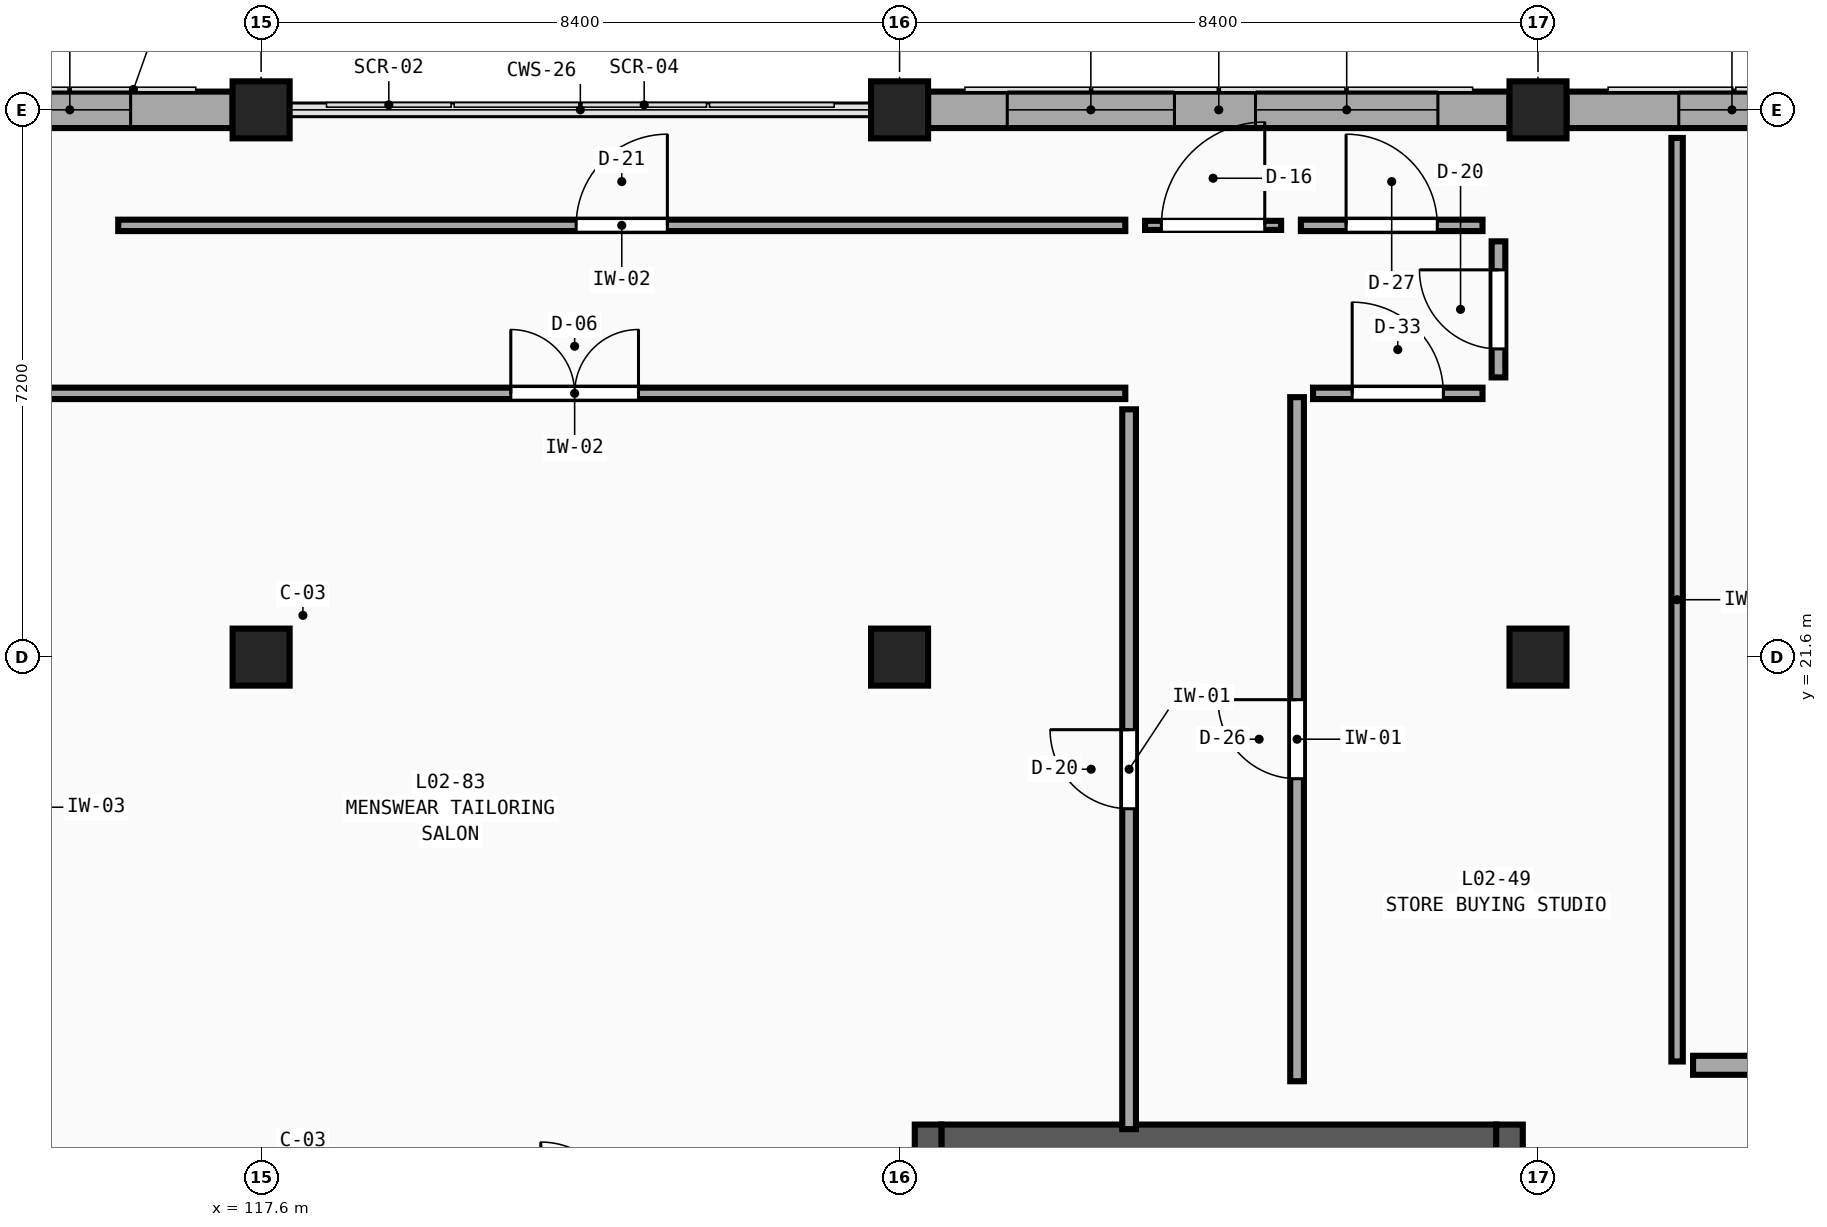
"""IFC4 building model, lengths in metres.
Left out: names, types, materials, properties, quantities, classifications, styles, units other than length and angle.
Written with IfcOpenShell. Run it as: python <this file> out.ifc"""

import sys

from ifc_helpers import new_model, si_unit, direction, frame, frame_2d, origin, origin_2d, place, context, subcontext, project, spatial, rectangle, extrude, element, fill, save


model = new_model("IFC4")
c1 = context("Model", 3, precision=1e-05, world=origin(), true_north=direction((0.0, 1.0)))
c2 = subcontext(c1, "Body", "Model", "MODEL_VIEW")
j1 = project(units=[si_unit("LENGTHUNIT", "METRE"), si_unit("PLANEANGLEUNIT", "RADIAN")], contexts=[c1])
p1 = place(None, origin())
s1 = spatial("IfcSite", under=j1, at=p1, CompositionType="ELEMENT")
p2 = place(p1, origin())
s2 = spatial("IfcBuilding", under=s1, at=p2, CompositionType="ELEMENT")
p3 = place(p2, frame((0.0, 0.0, 9.9)))
s3 = spatial("IfcBuildingStorey", under=s2, at=p3, CompositionType="ELEMENT", Elevation=9.9)
for number, where, z_axis, x_axis in (
    (1, (117.6, 21.6, 0.0), (0.0, 0.0, 1.0), (1.0, 0.0, 0.0)),
    (2, (117.6, 28.8, 0.0), (0.0, 0.0, 1.0), (1.0, 0.0, 0.0)),
    (3, (126.0, 21.6, 0.0), (0.0, 0.0, 1.0), (1.0, 0.0, 0.0)),
    (4, (126.0, 28.8, 0.0), (0.0, 0.0, 1.0), (1.0, 0.0, 0.0)),
    (5, (134.4, 21.6, 0.0), (0.0, 0.0, 1.0), (1.0, 0.0, 0.0)),
    (6, (134.4, 28.8, 0.0), (0.0, 0.0, 1.0), (1.0, 0.0, 0.0)),
):
    element("IfcColumn", number, at=place(p3, frame(where, z_axis=z_axis, x_axis=x_axis)), inside=s3, PredefinedType="COLUMN", context=c2, shape_type="SweptSolid", body=[
        extrude(rectangle(XDim=0.75, YDim=0.75, at=origin_2d()), origin(), (0.0, 0.0, 1.0), 4.5),
    ])
p4 = place(p3, frame((109.575, 28.8, 0.0), z_axis=(0.0, 0.0, 1.0), x_axis=(1.0, 0.0, 0.0)))
e7 = element("IfcWall", 7, at=p4, inside=s3, PredefinedType="SOLIDWALL", context=c2, shape_type="SweptSolid", body=[
    extrude(rectangle(XDim=7.65, YDim=0.48, at=frame_2d((3.825, 0.0))), origin(), (0.0, 0.0, 1.0), 3.63),
])
p5 = place(p4, frame((1.442, 0.0, 0.75)))
e8 = element("IfcOpeningElement", 8, at=p5, cuts=e7, PredefinedType="OPENING", context=c2, shape_type="SweptSolid", body=[
    extrude(rectangle(XDim=1.4, YDim=2.73, at=frame_2d((0.7, 1.365))), frame((0.0, 0.26, 0.0), z_axis=(0.0, -1.0, 0.0), x_axis=(1.0, 0.0, 0.0)), (0.0, 0.0, 1.0), 0.52),
])
p6 = place(p4, frame((4.708, 0.0, 0.75)))
e9 = element("IfcOpeningElement", 9, at=p6, cuts=e7, PredefinedType="OPENING", context=c2, shape_type="SweptSolid", body=[
    extrude(rectangle(XDim=1.6, YDim=2.73, at=frame_2d((0.8, 1.365))), frame((0.0, 0.26, 0.0), z_axis=(0.0, -1.0, 0.0), x_axis=(1.0, 0.0, 0.0)), (0.0, 0.0, 1.0), 0.52),
])
p7 = place(p3, frame((126.375, 28.8, 0.0), z_axis=(0.0, 0.0, 1.0), x_axis=(1.0, 0.0, 0.0)))
e10 = element("IfcWall", 10, at=p7, inside=s3, PredefinedType="SOLIDWALL", context=c2, shape_type="SweptSolid", body=[
    extrude(rectangle(XDim=7.65, YDim=0.48, at=frame_2d((3.825, 0.0))), origin(), (0.0, 0.0, 1.0), 3.63),
])
p8 = place(p7, frame((1.042, 0.0, 0.75)))
e11 = element("IfcOpeningElement", 11, at=p8, cuts=e10, PredefinedType="OPENING", context=c2, shape_type="SweptSolid", body=[
    extrude(rectangle(XDim=2.2, YDim=2.73, at=frame_2d((1.1, 1.365))), frame((0.0, 0.26, 0.0), z_axis=(0.0, -1.0, 0.0), x_axis=(1.0, 0.0, 0.0)), (0.0, 0.0, 1.0), 0.52),
])
p9 = place(p7, frame((4.308, 0.0, 0.75)))
e12 = element("IfcOpeningElement", 12, at=p9, cuts=e10, PredefinedType="OPENING", context=c2, shape_type="SweptSolid", body=[
    extrude(rectangle(XDim=2.4, YDim=2.73, at=frame_2d((1.2, 1.365))), frame((0.0, 0.26, 0.0), z_axis=(0.0, -1.0, 0.0), x_axis=(1.0, 0.0, 0.0)), (0.0, 0.0, 1.0), 0.52),
])
p10 = place(p3, frame((134.775, 28.8, 0.0), z_axis=(0.0, 0.0, 1.0), x_axis=(1.0, 0.0, 0.0)))
e13 = element("IfcWall", 13, at=p10, inside=s3, PredefinedType="SOLIDWALL", context=c2, shape_type="SweptSolid", body=[
    extrude(rectangle(XDim=7.775, YDim=0.48, at=frame_2d((3.888, 0.0))), origin(), (0.0, 0.0, 1.0), 3.63),
])
p11 = place(p10, frame((1.477, 0.0, 0.75)))
e14 = element("IfcOpeningElement", 14, at=p11, cuts=e13, PredefinedType="OPENING", context=c2, shape_type="SweptSolid", body=[
    extrude(rectangle(XDim=1.4, YDim=1.9, at=frame_2d((0.7, 0.95))), frame((0.0, 0.26, 0.0), z_axis=(0.0, -1.0, 0.0), x_axis=(1.0, 0.0, 0.0)), (0.0, 0.0, 1.0), 0.52),
])
p12 = place(p10, frame((4.798, 0.0, 0.75)))
e15 = element("IfcOpeningElement", 15, at=p12, cuts=e13, PredefinedType="OPENING", context=c2, shape_type="SweptSolid", body=[
    extrude(rectangle(XDim=1.6, YDim=1.9, at=frame_2d((0.8, 0.95))), frame((0.0, 0.26, 0.0), z_axis=(0.0, -1.0, 0.0), x_axis=(1.0, 0.0, 0.0)), (0.0, 0.0, 1.0), 0.52),
])
p13 = place(p3, frame((126.55, 15.275, 0.0), z_axis=(0.0, 0.0, 1.0), x_axis=(1.0, 0.0, 0.0)))
e16 = element("IfcWall", 16, at=p13, inside=s3, PredefinedType="SHEAR", context=c2, shape_type="SweptSolid", body=[
    extrude(rectangle(XDim=7.3, YDim=0.35, at=frame_2d((3.65, 0.0))), origin(), (0.0, 0.0, 1.0), 4.5),
])
for number, where, z_axis, x_axis in (
    (17, (126.375, 15.45, 0.0), (0.0, 0.0, 1.0), (0.0, -1.0, 0.0)),
    (18, (134.025, 7.3, 0.0), (0.0, 0.0, 1.0), (0.0, 1.0, 0.0)),
):
    element("IfcWall", number, at=place(p3, frame(where, z_axis=z_axis, x_axis=x_axis)), inside=s3, PredefinedType="SHEAR", context=c2, shape_type="SweptSolid", body=[
        extrude(rectangle(XDim=8.15, YDim=0.35, at=frame_2d((4.075, 0.0))), origin(), (0.0, 0.0, 1.0), 4.5),
    ])
p14 = place(p3, frame((114.48, 25.07, 0.0), z_axis=(0.0, 0.0, 1.0), x_axis=(1.0, 0.0, 0.0)))
e19 = element("IfcWall", 19, at=p14, inside=s3, PredefinedType="PARTITIONING", context=c2, shape_type="SweptSolid", body=[
    extrude(rectangle(XDim=14.49, YDim=0.15, at=frame_2d((7.245, 0.0))), origin(), (0.0, 0.0, 1.0), 4.18),
])
p15 = place(p14, frame((6.405, 0.0, 0.0)))
e20 = element("IfcOpeningElement", 20, at=p15, cuts=e19, PredefinedType="OPENING", context=c2, shape_type="SweptSolid", body=[
    extrude(rectangle(XDim=1.68, YDim=2.05, at=frame_2d((0.84, 1.025))), frame((0.0, 0.095, 0.0), z_axis=(0.0, -1.0, 0.0), x_axis=(1.0, 0.0, 0.0)), (0.0, 0.0, 1.0), 0.19),
])
p16 = place(p3, frame((115.72, 27.28, 0.0), z_axis=(0.0, 0.0, 1.0), x_axis=(1.0, 0.0, 0.0)))
e21 = element("IfcWall", 21, at=p16, inside=s3, PredefinedType="PARTITIONING", context=c2, shape_type="SweptSolid", body=[
    extrude(rectangle(XDim=13.25, YDim=0.15, at=frame_2d((6.625, 0.0))), origin(), (0.0, 0.0, 1.0), 4.18),
])
p17 = place(p16, frame((6.025, 0.0, 0.0)))
e22 = element("IfcOpeningElement", 22, at=p17, cuts=e21, PredefinedType="OPENING", context=c2, shape_type="SweptSolid", body=[
    extrude(rectangle(XDim=1.2, YDim=2.29, at=frame_2d((0.6, 1.145))), frame((0.0, 0.095, 0.0), z_axis=(0.0, -1.0, 0.0), x_axis=(1.0, 0.0, 0.0)), (0.0, 0.0, 1.0), 0.19),
])
p18 = place(p3, frame((129.02, 15.39, 0.0), z_axis=(0.0, 0.0, 1.0), x_axis=(0.0, 1.0, 0.0)))
e23 = element("IfcWall", 23, at=p18, inside=s3, PredefinedType="PARTITIONING", context=c2, shape_type="SweptSolid", body=[
    extrude(rectangle(XDim=9.47, YDim=0.18, at=frame_2d((4.735, 0.0))), origin(), (0.0, 0.0, 1.0), 4.18),
])
p19 = place(p18, frame((4.215, 0.0, 0.0)))
e24 = element("IfcOpeningElement", 24, at=p19, cuts=e23, PredefinedType="OPENING", context=c2, shape_type="SweptSolid", body=[
    extrude(rectangle(XDim=1.04, YDim=2.29, at=frame_2d((0.52, 1.145))), frame((0.0, 0.11, 0.0), z_axis=(0.0, -1.0, 0.0), x_axis=(1.0, 0.0, 0.0)), (0.0, 0.0, 1.0), 0.22),
])
p20 = place(p3, frame((131.23, 16.02, 0.0), z_axis=(0.0, 0.0, 1.0), x_axis=(0.0, 1.0, 0.0)))
e25 = element("IfcWall", 25, at=p20, inside=s3, PredefinedType="PARTITIONING", context=c2, shape_type="SweptSolid", body=[
    extrude(rectangle(XDim=9.0, YDim=0.18, at=frame_2d((4.5, 0.0))), origin(), (0.0, 0.0, 1.0), 4.18),
])
p21 = place(p20, frame((3.98, 0.0, 0.0)))
e26 = element("IfcOpeningElement", 26, at=p21, cuts=e25, PredefinedType="OPENING", context=c2, shape_type="SweptSolid", body=[
    extrude(rectangle(XDim=1.04, YDim=2.37, at=frame_2d((0.52, 1.185))), frame((0.0, 0.11, 0.0), z_axis=(0.0, -1.0, 0.0), x_axis=(1.0, 0.0, 0.0)), (0.0, 0.0, 1.0), 0.22),
])
p22 = place(p3, frame((131.28, 27.28, 0.0), z_axis=(0.0, 0.0, 1.0), x_axis=(1.0, 0.0, 0.0)))
e27 = element("IfcWall", 27, at=p22, inside=s3, PredefinedType="PARTITIONING", context=c2, shape_type="SweptSolid", body=[
    extrude(rectangle(XDim=2.39, YDim=0.15, at=frame_2d((1.195, 0.0))), origin(), (0.0, 0.0, 1.0), 4.18),
])
p23 = place(p22, frame((0.595, 0.0, 0.0)))
e28 = element("IfcOpeningElement", 28, at=p23, cuts=e27, PredefinedType="OPENING", context=c2, shape_type="SweptSolid", body=[
    extrude(rectangle(XDim=1.2, YDim=2.37, at=frame_2d((0.6, 1.185))), frame((0.0, 0.095, 0.0), z_axis=(0.0, -1.0, 0.0), x_axis=(1.0, 0.0, 0.0)), (0.0, 0.0, 1.0), 0.19),
])
p24 = place(p3, frame((131.44, 25.07, 0.0), z_axis=(0.0, 0.0, 1.0), x_axis=(1.0, 0.0, 0.0)))
e29 = element("IfcWall", 29, at=p24, inside=s3, PredefinedType="PARTITIONING", context=c2, shape_type="SweptSolid", body=[
    extrude(rectangle(XDim=2.23, YDim=0.15, at=frame_2d((1.115, 0.0))), origin(), (0.0, 0.0, 1.0), 4.18),
])
p25 = place(p24, frame((0.515, 0.0, 0.0)))
e30 = element("IfcOpeningElement", 30, at=p25, cuts=e29, PredefinedType="OPENING", context=c2, shape_type="SweptSolid", body=[
    extrude(rectangle(XDim=1.2, YDim=2.45, at=frame_2d((0.6, 1.225))), frame((0.0, 0.095, 0.0), z_axis=(0.0, -1.0, 0.0), x_axis=(1.0, 0.0, 0.0)), (0.0, 0.0, 1.0), 0.19),
])
p26 = place(p3, frame((129.23, 27.28, 0.0), z_axis=(0.0, 0.0, 1.0), x_axis=(1.0, 0.0, 0.0)))
e31 = element("IfcWall", 31, at=p26, inside=s3, PredefinedType="PARTITIONING", context=c2, shape_type="SweptSolid", body=[
    extrude(rectangle(XDim=1.79, YDim=0.12, at=frame_2d((0.895, 0.0))), origin(), (0.0, 0.0, 1.0), 4.18),
])
p27 = place(p26, frame((0.215, 0.0, 0.0)))
e32 = element("IfcOpeningElement", 32, at=p27, cuts=e31, PredefinedType="OPENING", context=c2, shape_type="SweptSolid", body=[
    extrude(rectangle(XDim=1.36, YDim=2.21, at=frame_2d((0.68, 1.105))), frame((0.0, 0.08, 0.0), z_axis=(0.0, -1.0, 0.0), x_axis=(1.0, 0.0, 0.0)), (0.0, 0.0, 1.0), 0.16),
])
p28 = place(p3, frame((133.88, 25.28, 0.0), z_axis=(0.0, 0.0, 1.0), x_axis=(0.0, 1.0, 0.0)))
e33 = element("IfcWall", 33, at=p28, inside=s3, PredefinedType="PARTITIONING", context=c2, shape_type="SweptSolid", body=[
    extrude(rectangle(XDim=1.79, YDim=0.18, at=frame_2d((0.895, 0.0))), origin(), (0.0, 0.0, 1.0), 3.73),
])
p29 = place(p28, frame((0.375, 0.0, 0.0)))
e34 = element("IfcOpeningElement", 34, at=p29, cuts=e33, PredefinedType="OPENING", context=c2, shape_type="SweptSolid", body=[
    extrude(rectangle(XDim=1.04, YDim=2.29, at=frame_2d((0.52, 1.145))), frame((0.0, 0.11, 0.0), z_axis=(0.0, -1.0, 0.0), x_axis=(1.0, 0.0, 0.0)), (0.0, 0.0, 1.0), 0.22),
])
p30 = place(p3, frame((136.44, 16.23, 0.0), z_axis=(0.0, 0.0, 1.0), x_axis=(1.0, 0.0, 0.0)))
e35 = element("IfcWall", 35, at=p30, inside=s3, PredefinedType="SOLIDWALL", context=c2, shape_type="SweptSolid", body=[
    extrude(rectangle(XDim=14.39, YDim=0.25, at=frame_2d((7.195, 0.0))), origin(), (0.0, 0.0, 1.0), 4.18),
])
p31 = place(p30, frame((7.302, 0.0, 0.0)))
e36 = element("IfcOpeningElement", 36, at=p31, cuts=e35, PredefinedType="OPENING", context=c2, shape_type="SweptSolid", body=[
    extrude(rectangle(XDim=1.8, YDim=2.3, at=frame_2d((0.9, 1.15))), frame((0.0, 0.145, 0.0), z_axis=(0.0, -1.0, 0.0), x_axis=(1.0, 0.0, 0.0)), (0.0, 0.0, 1.0), 0.29),
])
p32 = place(p3, frame((136.23, 16.28, 0.0), z_axis=(0.0, 0.0, 1.0), x_axis=(0.0, 1.0, 0.0)))
e37 = element("IfcWall", 37, at=p32, inside=s3, PredefinedType="PARTITIONING", context=c2, shape_type="SweptSolid", body=[
    extrude(rectangle(XDim=12.15, YDim=0.15, at=frame_2d((6.075, 0.0))), origin(), (0.0, 0.0, 1.0), 4.18),
])
p33 = place(p6, origin())
e38 = element("IfcWindow", 38, at=p33, inside=s3, PartitioningType="DOUBLE_PANEL_VERTICAL", PredefinedType="WINDOW", context=c2, shape_type="SweptSolid", body=[
    extrude(rectangle(XDim=1.6, YDim=2.73, at=frame_2d((0.8, 1.365))), frame((0.0, 0.03, 0.0), z_axis=(0.0, -1.0, 0.0), x_axis=(1.0, 0.0, 0.0)), (0.0, 0.0, 1.0), 0.06),
])
fill(e9, e38)
p34 = place(p8, origin())
e39 = element("IfcWindow", 39, at=p34, inside=s3, PartitioningType="TRIPLE_PANEL_VERTICAL", PredefinedType="WINDOW", context=c2, shape_type="SweptSolid", body=[
    extrude(rectangle(XDim=2.2, YDim=2.73, at=frame_2d((1.1, 1.365))), frame((0.0, 0.03, 0.0), z_axis=(0.0, -1.0, 0.0), x_axis=(1.0, 0.0, 0.0)), (0.0, 0.0, 1.0), 0.06),
])
fill(e11, e39)
p35 = place(p9, origin())
e40 = element("IfcWindow", 40, at=p35, inside=s3, PartitioningType="TRIPLE_PANEL_VERTICAL", PredefinedType="WINDOW", context=c2, shape_type="SweptSolid", body=[
    extrude(rectangle(XDim=2.4, YDim=2.73, at=frame_2d((1.2, 1.365))), frame((0.0, 0.03, 0.0), z_axis=(0.0, -1.0, 0.0), x_axis=(1.0, 0.0, 0.0)), (0.0, 0.0, 1.0), 0.06),
])
fill(e12, e40)
p36 = place(p11, origin())
e41 = element("IfcWindow", 41, at=p36, inside=s3, PartitioningType="DOUBLE_PANEL_VERTICAL", PredefinedType="WINDOW", context=c2, shape_type="SweptSolid", body=[
    extrude(rectangle(XDim=1.4, YDim=1.9, at=frame_2d((0.7, 0.95))), frame((0.0, 0.03, 0.0), z_axis=(0.0, -1.0, 0.0), x_axis=(1.0, 0.0, 0.0)), (0.0, 0.0, 1.0), 0.06),
])
fill(e14, e41)
p37 = place(p15, origin())
e42 = element("IfcDoor", 42, at=p37, inside=s3, OperationType="DOUBLE_DOOR_SINGLE_SWING", PredefinedType="DOOR", context=c2, shape_type="SweptSolid", body=[
    extrude(rectangle(XDim=1.68, YDim=2.05, at=frame_2d((0.84, 1.025))), frame((0.0, 0.025, 0.0), z_axis=(0.0, -1.0, 0.0), x_axis=(1.0, 0.0, 0.0)), (0.0, 0.0, 1.0), 0.05),
])
fill(e20, e42)
p38 = place(p17, origin())
e43 = element("IfcDoor", 43, at=p38, inside=s3, OperationType="SINGLE_SWING_RIGHT", PredefinedType="DOOR", context=c2, shape_type="SweptSolid", body=[
    extrude(rectangle(XDim=1.2, YDim=2.29, at=frame_2d((0.6, 1.145))), frame((0.0, 0.025, 0.0), z_axis=(0.0, -1.0, 0.0), x_axis=(1.0, 0.0, 0.0)), (0.0, 0.0, 1.0), 0.05),
])
fill(e22, e43)
p39 = place(p19, origin())
e44 = element("IfcDoor", 44, at=p39, inside=s3, OperationType="SINGLE_SWING_RIGHT", PredefinedType="DOOR", context=c2, shape_type="SweptSolid", body=[
    extrude(rectangle(XDim=1.04, YDim=2.29, at=frame_2d((0.52, 1.145))), frame((0.0, 0.025, 0.0), z_axis=(0.0, -1.0, 0.0), x_axis=(1.0, 0.0, 0.0)), (0.0, 0.0, 1.0), 0.05),
])
fill(e24, e44)
p40 = place(p21, origin())
e45 = element("IfcDoor", 45, at=p40, inside=s3, OperationType="SINGLE_SWING_RIGHT", PredefinedType="DOOR", context=c2, shape_type="SweptSolid", body=[
    extrude(rectangle(XDim=1.04, YDim=2.37, at=frame_2d((0.52, 1.185))), frame((0.0, 0.025, 0.0), z_axis=(0.0, -1.0, 0.0), x_axis=(1.0, 0.0, 0.0)), (0.0, 0.0, 1.0), 0.05),
])
fill(e26, e45)
p41 = place(p23, origin())
e46 = element("IfcDoor", 46, at=p41, inside=s3, OperationType="SINGLE_SWING_LEFT", PredefinedType="DOOR", context=c2, shape_type="SweptSolid", body=[
    extrude(rectangle(XDim=1.2, YDim=2.37, at=frame_2d((0.6, 1.185))), frame((0.0, 0.025, 0.0), z_axis=(0.0, -1.0, 0.0), x_axis=(1.0, 0.0, 0.0)), (0.0, 0.0, 1.0), 0.05),
])
fill(e28, e46)
p42 = place(p25, origin())
e47 = element("IfcDoor", 47, at=p42, inside=s3, OperationType="SINGLE_SWING_LEFT", PredefinedType="DOOR", context=c2, shape_type="SweptSolid", body=[
    extrude(rectangle(XDim=1.2, YDim=2.45, at=frame_2d((0.6, 1.225))), frame((0.0, 0.025, 0.0), z_axis=(0.0, -1.0, 0.0), x_axis=(1.0, 0.0, 0.0)), (0.0, 0.0, 1.0), 0.05),
])
fill(e30, e47)
p43 = place(p27, origin())
e48 = element("IfcDoor", 48, at=p43, inside=s3, OperationType="SINGLE_SWING_RIGHT", PredefinedType="DOOR", context=c2, shape_type="SweptSolid", body=[
    extrude(rectangle(XDim=1.36, YDim=2.21, at=frame_2d((0.68, 1.105))), frame((0.0, 0.025, 0.0), z_axis=(0.0, -1.0, 0.0), x_axis=(1.0, 0.0, 0.0)), (0.0, 0.0, 1.0), 0.05),
])
fill(e32, e48)
p44 = place(p29, origin())
e49 = element("IfcDoor", 49, at=p44, inside=s3, OperationType="SINGLE_SWING_RIGHT", PredefinedType="DOOR", context=c2, shape_type="SweptSolid", body=[
    extrude(rectangle(XDim=1.04, YDim=2.29, at=frame_2d((0.52, 1.145))), frame((0.0, 0.025, 0.0), z_axis=(0.0, -1.0, 0.0), x_axis=(1.0, 0.0, 0.0)), (0.0, 0.0, 1.0), 0.05),
])
fill(e34, e49)
save(model, sys.argv[1])
